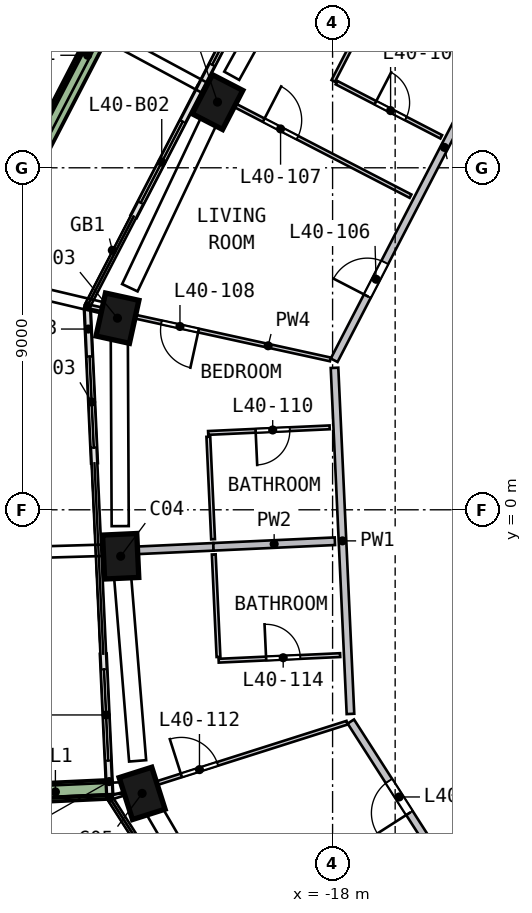
"""IFC4 building model, lengths in metres.
Left out: names, types, materials, properties, quantities, classifications, styles, units other than length and angle.
Written with IfcOpenShell. Run it as: python <this file> out.ifc"""

import sys

from ifc_helpers import new_model, si_unit, direction, frame, frame_2d, origin, origin_2d, place, context, subcontext, project, spatial, rectangle, extrude, element, fill, save


model = new_model("IFC4")
c1 = context("Model", 3, precision=1e-05, world=origin(), true_north=direction((0.0, 1.0)))
c2 = subcontext(c1, "Body", "Model", "MODEL_VIEW")
j1 = project(units=[si_unit("LENGTHUNIT", "METRE"), si_unit("PLANEANGLEUNIT", "RADIAN")], contexts=[c1])
p1 = place(None, origin())
s1 = spatial("IfcSite", under=j1, at=p1, CompositionType="ELEMENT")
p2 = place(p1, origin())
s2 = spatial("IfcBuilding", under=s1, at=p2, CompositionType="ELEMENT")
p3 = place(p2, frame((0.0, 0.0, 165.5)))
s3 = spatial("IfcBuildingStorey", under=s2, at=p3, CompositionType="ELEMENT", Elevation=165.5)
p4 = place(p3, frame((-20.967, 10.85, 0.0), z_axis=(-0.050783742, -0.100111899, 0.993679334), x_axis=(-0.457036789, -0.882336041, -0.112251882)))
e1 = element("IfcColumn", 1, at=p4, inside=s3, PredefinedType="COLUMN", context=c2, shape_type="SweptSolid", body=[
    extrude(rectangle(XDim=1.15, YDim=0.9, at=origin_2d()), origin(), (0.0, 0.0, 1.0), 3.019),
])
p5 = place(p3, frame((-23.632, 5.178, 0.0), z_axis=(-0.023766796, -0.112609342, 0.99335506), x_axis=(0.213378086, 0.970167516, 0.115085979)))
e2 = element("IfcColumn", 2, at=p5, inside=s3, PredefinedType="COLUMN", context=c2, shape_type="SweptSolid", body=[
    extrude(rectangle(XDim=1.15, YDim=0.9, at=origin_2d()), origin(), (0.0, 0.0, 1.0), 3.02),
])
p6 = place(p3, frame((-23.583, -1.087, 0.0), z_axis=(0.006145753, -0.112159985, 0.993671157), x_axis=(0.045945291, -0.992608833, -0.112324243)))
e3 = element("IfcColumn", 3, at=p6, inside=s3, PredefinedType="COLUMN", context=c2, shape_type="SweptSolid", body=[
    extrude(rectangle(XDim=1.15, YDim=0.9, at=origin_2d()), origin(), (0.0, 0.0, 1.0), 3.019),
])
p7 = place(p3, frame((-23.055, -7.331, 0.0), z_axis=(0.035812192, -0.109295901, 0.993363928), x_axis=(-0.301282406, 0.946573687, 0.115009418)))
e4 = element("IfcColumn", 4, at=p7, inside=s3, PredefinedType="COLUMN", context=c2, shape_type="SweptSolid", body=[
    extrude(rectangle(XDim=1.15, YDim=0.9, at=origin_2d()), origin(), (0.0, 0.0, 1.0), 3.02),
])
p8 = place(p3, frame((-19.881, 14.2, 0.0), z_axis=(0.0, 0.0, 1.0), x_axis=(-0.459564354, -0.888144473, 0.0)))
e5 = element("IfcWall", 5, at=p8, inside=s3, PredefinedType="SOLIDWALL", context=c2, shape_type="SweptSolid", body=[
    extrude(rectangle(XDim=3.475, YDim=0.15, at=frame_2d((1.737, 0.0))), origin(), (0.0, 0.0, 1.0), 2.935),
])
p9 = place(p8, frame((0.4, 0.0, 0.0)))
e6 = element("IfcOpeningElement", 6, at=p9, cuts=e5, PredefinedType="OPENING", context=c2, shape_type="SweptSolid", body=[
    extrude(rectangle(XDim=2.4, YDim=2.4, at=frame_2d((1.2, 1.2))), frame((0.0, 0.085, 0.0), z_axis=(0.0, -1.0, 0.0), x_axis=(1.0, 0.0, 0.0)), (0.0, 0.0, 1.0), 0.17),
])
p10 = place(p3, frame((-21.478, 11.114, 0.0), z_axis=(0.0, 0.0, 1.0), x_axis=(-0.459588339, -0.888132062, 0.0)))
e7 = element("IfcWall", 7, at=p10, inside=s3, PredefinedType="SOLIDWALL", context=c2, shape_type="SweptSolid", body=[
    extrude(rectangle(XDim=3.814, YDim=0.15, at=frame_2d((1.907, 0.0))), origin(), (0.0, 0.0, 1.0), 2.935),
])
p11 = place(p10, frame((1.014, 0.0, 0.0)))
e8 = element("IfcOpeningElement", 8, at=p11, cuts=e7, PredefinedType="OPENING", context=c2, shape_type="SweptSolid", body=[
    extrude(rectangle(XDim=2.4, YDim=2.4, at=frame_2d((1.2, 1.2))), frame((0.0, 0.085, 0.0), z_axis=(0.0, -1.0, 0.0), x_axis=(1.0, 0.0, 0.0)), (0.0, 0.0, 1.0), 0.17),
])
p12 = place(p3, frame((-24.452, 5.279, 0.0), z_axis=(0.0, 0.0, 1.0), x_axis=(0.046034373, -0.998939856, 0.0)))
e9 = element("IfcWall", 9, at=p12, inside=s3, PredefinedType="SOLIDWALL", context=c2, shape_type="SweptSolid", body=[
    extrude(rectangle(XDim=4.047, YDim=0.15, at=frame_2d((2.023, 0.0))), origin(), (0.0, 0.0, 1.0), 2.935),
])
p13 = place(p12, frame((1.247, 0.0, 0.0)))
e10 = element("IfcOpeningElement", 10, at=p13, cuts=e9, PredefinedType="OPENING", context=c2, shape_type="SweptSolid", body=[
    extrude(rectangle(XDim=2.4, YDim=2.4, at=frame_2d((1.2, 1.2))), frame((0.0, 0.085, 0.0), z_axis=(0.0, -1.0, 0.0), x_axis=(1.0, 0.0, 0.0)), (0.0, 0.0, 1.0), 0.17),
])
p14 = place(p3, frame((-24.034, -3.801, 0.0), z_axis=(0.0, 0.0, 1.0), x_axis=(0.046064357, -0.998938474, 0.0)))
e11 = element("IfcWall", 11, at=p14, inside=s3, PredefinedType="SOLIDWALL", context=c2, shape_type="SweptSolid", body=[
    extrude(rectangle(XDim=3.71, YDim=0.15, at=frame_2d((1.855, 0.0))), origin(), (0.0, 0.0, 1.0), 2.935),
])
p15 = place(p14, frame((0.4, 0.0, 0.0)))
e12 = element("IfcOpeningElement", 12, at=p15, cuts=e11, PredefinedType="OPENING", context=c2, shape_type="SweptSolid", body=[
    extrude(rectangle(XDim=2.4, YDim=2.4, at=frame_2d((1.2, 1.2))), frame((0.0, 0.085, 0.0), z_axis=(0.0, -1.0, 0.0), x_axis=(1.0, 0.0, 0.0)), (0.0, 0.0, 1.0), 0.17),
])
p16 = place(p3, frame((-21.407, 17.833, 0.0), z_axis=(0.0, 0.0, 1.0), x_axis=(-0.459570076, -0.888141512, 0.0)))
e13 = element("IfcWall", 13, at=p16, inside=s3, PredefinedType="SOLIDWALL", context=c2, shape_type="SweptSolid", body=[
    extrude(rectangle(XDim=13.224, YDim=0.5, at=frame_2d((6.612, 0.0))), origin(), (0.0, 0.0, 1.0), 0.7),
])
p17 = place(p3, frame((-26.642, -7.485, 0.0), z_axis=(0.0, 0.0, 1.0), x_axis=(0.998939428, 0.046043663, 0.0)))
e14 = element("IfcWall", 14, at=p17, inside=s3, PredefinedType="SOLIDWALL", context=c2, shape_type="SweptSolid", body=[
    extrude(rectangle(XDim=2.699, YDim=0.5, at=frame_2d((1.35, 0.0))), origin(), (0.0, 0.0, 1.0), 0.7),
])
p18 = place(p3, frame((-17.949, 3.736, 0.0), z_axis=(0.0, 0.0, 1.0), x_axis=(0.046061188, -0.99893862, 0.0)))
e15 = element("IfcWall", 15, at=p18, inside=s3, PredefinedType="SOLIDWALL", context=c2, shape_type="SweptSolid", body=[
    extrude(rectangle(XDim=9.117, YDim=0.2, at=frame_2d((4.558, 0.0))), origin(), (0.0, 0.0, 1.0), 3.0),
])
p19 = place(p3, frame((-17.959, 3.935, 0.0), z_axis=(0.0, 0.0, 1.0), x_axis=(0.459586917, 0.888132797, 0.0)))
e16 = element("IfcWall", 16, at=p19, inside=s3, PredefinedType="SOLIDWALL", context=c2, shape_type="SweptSolid", body=[
    extrude(rectangle(XDim=9.517, YDim=0.2, at=frame_2d((4.758, 0.0))), origin(), (0.0, 0.0, 1.0), 3.0),
])
p20 = place(p19, frame((1.9, 0.0, 0.0)))
e17 = element("IfcOpeningElement", 17, at=p20, cuts=e16, PredefinedType="OPENING", context=c2, shape_type="SweptSolid", body=[
    extrude(rectangle(XDim=1.0, YDim=2.1, at=frame_2d((0.5, 1.05))), frame((0.0, 0.11, 0.0), z_axis=(0.0, -1.0, 0.0), x_axis=(1.0, 0.0, 0.0)), (0.0, 0.0, 1.0), 0.22),
])
p21 = place(p3, frame((-12.387, -13.585, 0.0), z_axis=(0.0, 0.0, 1.0), x_axis=(-0.539356505, 0.842077526, 0.0)))
e18 = element("IfcWall", 18, at=p21, inside=s3, PredefinedType="SOLIDWALL", context=c2, shape_type="SweptSolid", body=[
    extrude(rectangle(XDim=9.517, YDim=0.2, at=frame_2d((4.758, 0.0))), origin(), (0.0, 0.0, 1.0), 3.0),
])
p22 = place(p21, frame((6.658, 0.0, 0.0)))
e19 = element("IfcOpeningElement", 19, at=p22, cuts=e18, PredefinedType="OPENING", context=c2, shape_type="SweptSolid", body=[
    extrude(rectangle(XDim=1.0, YDim=2.1, at=frame_2d((0.5, 1.05))), frame((0.0, 0.11, 0.0), z_axis=(0.0, -1.0, 0.0), x_axis=(1.0, 0.0, 0.0)), (0.0, 0.0, 1.0), 0.22),
])
p23 = place(p3, frame((-21.136, -0.975, 0.0), z_axis=(0.0, 0.0, 1.0), x_axis=(-0.998940711, -0.046015827, 0.0)))
e20 = element("IfcWall", 20, at=p23, inside=s3, PredefinedType="SOLIDWALL", context=c2, shape_type="SweptSolid", body=[
    extrude(rectangle(XDim=2.95, YDim=0.2, at=frame_2d((1.475, 0.0))), origin(), (0.0, 0.0, 1.0), 3.0),
])
p24 = place(p3, frame((-17.939, -0.827, 0.0), z_axis=(0.0, 0.0, 1.0), x_axis=(-0.998937799, -0.046079, 0.0)))
e21 = element("IfcWall", 21, at=p24, inside=s3, PredefinedType="SOLIDWALL", context=c2, shape_type="SweptSolid", body=[
    extrude(rectangle(XDim=3.2, YDim=0.2, at=frame_2d((1.6, 0.0))), origin(), (0.0, 0.0, 1.0), 3.0),
])
p25 = place(p3, frame((-18.06, 3.958, 0.0), z_axis=(0.0, 0.0, 1.0), x_axis=(-0.976827652, 0.214027425, 0.0)))
e22 = element("IfcWall", 22, at=p25, inside=s3, PredefinedType="PARTITIONING", context=c2, shape_type="SweptSolid", body=[
    extrude(rectangle(XDim=6.476, YDim=0.1, at=frame_2d((3.238, 0.0))), origin(), (0.0, 0.0, 1.0), 3.0),
])
p26 = place(p25, frame((3.55, 0.0, 0.0)))
e23 = element("IfcOpeningElement", 23, at=p26, cuts=e22, PredefinedType="OPENING", context=c2, shape_type="SweptSolid", body=[
    extrude(rectangle(XDim=1.0, YDim=2.1, at=frame_2d((0.5, 1.05))), frame((0.0, 0.06, 0.0), z_axis=(0.0, -1.0, 0.0), x_axis=(1.0, 0.0, 0.0)), (0.0, 0.0, 1.0), 0.12),
])
for number, where, z_axis, x_axis in (
    (24, (-21.269, 1.922, 0.0), (0.0, 0.0, 1.0), (0.046, -0.999, 0.0)),
    (25, (-21.127, -1.174, 0.0), (0.0, 0.0, 1.0), (0.046, -0.999, 0.0)),
):
    element("IfcWall", number, at=place(p3, frame(where, z_axis=z_axis, x_axis=x_axis)), inside=s3, PredefinedType="PARTITIONING", context=c2, shape_type="SweptSolid", body=[
        extrude(rectangle(XDim=2.7, YDim=0.1, at=frame_2d((1.35, 0.0))), origin(), (0.0, 0.0, 1.0), 3.0),
    ])
p27 = place(p3, frame((-23.79, -7.565, 0.0), z_axis=(0.0, 0.0, 1.0), x_axis=(0.952980228, 0.303032482, 0.0)))
e26 = element("IfcWall", 26, at=p27, inside=s3, PredefinedType="PARTITIONING", context=c2, shape_type="SweptSolid", body=[
    extrude(rectangle(XDim=6.476, YDim=0.1, at=frame_2d((3.238, 0.0))), origin(), (0.0, 0.0, 1.0), 3.0),
])
p28 = place(p27, frame((1.9, 0.0, 0.0)))
e27 = element("IfcOpeningElement", 27, at=p28, cuts=e26, PredefinedType="OPENING", context=c2, shape_type="SweptSolid", body=[
    extrude(rectangle(XDim=1.0, YDim=2.1, at=frame_2d((0.5, 1.05))), frame((0.0, 0.06, 0.0), z_axis=(0.0, -1.0, 0.0), x_axis=(1.0, 0.0, 0.0)), (0.0, 0.0, 1.0), 0.12),
])
p29 = place(p3, frame((-18.077, 2.17, 0.0), z_axis=(0.0, 0.0, 1.0), x_axis=(-0.998937799, -0.046079, 0.0)))
e28 = element("IfcWall", 28, at=p29, inside=s3, PredefinedType="PARTITIONING", context=c2, shape_type="SweptSolid", body=[
    extrude(rectangle(XDim=3.2, YDim=0.1, at=frame_2d((1.6, 0.0))), origin(), (0.0, 0.0, 1.0), 3.0),
])
p30 = place(p29, frame((1.05, 0.0, 0.0)))
e29 = element("IfcOpeningElement", 29, at=p30, cuts=e28, PredefinedType="OPENING", context=c2, shape_type="SweptSolid", body=[
    extrude(rectangle(XDim=0.9, YDim=2.1, at=frame_2d((0.45, 1.05))), frame((0.0, 0.06, 0.0), z_axis=(0.0, -1.0, 0.0), x_axis=(1.0, 0.0, 0.0)), (0.0, 0.0, 1.0), 0.12),
])
p31 = place(p3, frame((-20.998, -3.971, 0.0), z_axis=(0.0, 0.0, 1.0), x_axis=(0.998937799, 0.046079, 0.0)))
e30 = element("IfcWall", 30, at=p31, inside=s3, PredefinedType="PARTITIONING", context=c2, shape_type="SweptSolid", body=[
    extrude(rectangle(XDim=3.2, YDim=0.1, at=frame_2d((1.6, 0.0))), origin(), (0.0, 0.0, 1.0), 3.0),
])
p32 = place(p31, frame((1.25, 0.0, 0.0)))
e31 = element("IfcOpeningElement", 31, at=p32, cuts=e30, PredefinedType="OPENING", context=c2, shape_type="SweptSolid", body=[
    extrude(rectangle(XDim=0.9, YDim=2.1, at=frame_2d((0.45, 1.05))), frame((0.0, 0.06, 0.0), z_axis=(0.0, -1.0, 0.0), x_axis=(1.0, 0.0, 0.0)), (0.0, 0.0, 1.0), 0.12),
])
p33 = place(p3, frame((-21.412, 11.08, 0.0), z_axis=(0.0, 0.0, 1.0), x_axis=(0.888156748, -0.45954063, 0.0)))
e32 = element("IfcWall", 32, at=p33, inside=s3, PredefinedType="PARTITIONING", context=c2, shape_type="SweptSolid", body=[
    extrude(rectangle(XDim=6.15, YDim=0.1, at=frame_2d((3.075, 0.0))), origin(), (0.0, 0.0, 1.0), 3.0),
])
p34 = place(p33, frame((1.8, 0.0, 0.0)))
e33 = element("IfcOpeningElement", 33, at=p34, cuts=e32, PredefinedType="OPENING", context=c2, shape_type="SweptSolid", body=[
    extrude(rectangle(XDim=1.0, YDim=2.1, at=frame_2d((0.5, 1.05))), frame((0.0, 0.06, 0.0), z_axis=(0.0, -1.0, 0.0), x_axis=(1.0, 0.0, 0.0)), (0.0, 0.0, 1.0), 0.12),
])
p35 = place(p3, frame((-16.281, 14.575, 0.0), z_axis=(0.0, 0.0, 1.0), x_axis=(-0.459614775, -0.888118381, 0.0)))
e34 = element("IfcWall", 34, at=p35, inside=s3, PredefinedType="PARTITIONING", context=c2, shape_type="SweptSolid", body=[
    extrude(rectangle(XDim=3.704, YDim=0.1, at=frame_2d((1.852, 0.0))), origin(), (0.0, 0.0, 1.0), 3.0),
])
p36 = place(p3, frame((-17.895, 11.24, 0.0), z_axis=(0.0, 0.0, 1.0), x_axis=(0.88815114, -0.459551468, 0.0)))
e35 = element("IfcWall", 35, at=p36, inside=s3, PredefinedType="PARTITIONING", context=c2, shape_type="SweptSolid", body=[
    extrude(rectangle(XDim=3.1, YDim=0.1, at=frame_2d((1.55, 0.0))), origin(), (0.0, 0.0, 1.0), 3.0),
])
p37 = place(p36, frame((1.15, 0.0, 0.0)))
e36 = element("IfcOpeningElement", 36, at=p37, cuts=e35, PredefinedType="OPENING", context=c2, shape_type="SweptSolid", body=[
    extrude(rectangle(XDim=0.9, YDim=2.1, at=frame_2d((0.45, 1.05))), frame((0.0, 0.06, 0.0), z_axis=(0.0, -1.0, 0.0), x_axis=(1.0, 0.0, 0.0)), (0.0, 0.0, 1.0), 0.12),
])
p38 = place(p9, origin())
e37 = element("IfcDoor", 37, at=p38, inside=s3, OperationType="SLIDING_TO_RIGHT", PredefinedType="DOOR", context=c2, shape_type="SweptSolid", body=[
    extrude(rectangle(XDim=2.4, YDim=2.4, at=frame_2d((1.2, 1.2))), frame((0.0, 0.025, 0.0), z_axis=(0.0, -1.0, 0.0), x_axis=(1.0, 0.0, 0.0)), (0.0, 0.0, 1.0), 0.05),
])
fill(e6, e37)
p39 = place(p11, origin())
e38 = element("IfcDoor", 38, at=p39, inside=s3, OperationType="SLIDING_TO_LEFT", PredefinedType="DOOR", context=c2, shape_type="SweptSolid", body=[
    extrude(rectangle(XDim=2.4, YDim=2.4, at=frame_2d((1.2, 1.2))), frame((0.0, 0.025, 0.0), z_axis=(0.0, -1.0, 0.0), x_axis=(1.0, 0.0, 0.0)), (0.0, 0.0, 1.0), 0.05),
])
fill(e8, e38)
p40 = place(p13, origin())
e39 = element("IfcDoor", 39, at=p40, inside=s3, OperationType="SLIDING_TO_LEFT", PredefinedType="DOOR", context=c2, shape_type="SweptSolid", body=[
    extrude(rectangle(XDim=2.4, YDim=2.4, at=frame_2d((1.2, 1.2))), frame((0.0, 0.025, 0.0), z_axis=(0.0, -1.0, 0.0), x_axis=(1.0, 0.0, 0.0)), (0.0, 0.0, 1.0), 0.05),
])
fill(e10, e39)
p41 = place(p15, origin())
e40 = element("IfcDoor", 40, at=p41, inside=s3, OperationType="SLIDING_TO_RIGHT", PredefinedType="DOOR", context=c2, shape_type="SweptSolid", body=[
    extrude(rectangle(XDim=2.4, YDim=2.4, at=frame_2d((1.2, 1.2))), frame((0.0, 0.025, 0.0), z_axis=(0.0, -1.0, 0.0), x_axis=(1.0, 0.0, 0.0)), (0.0, 0.0, 1.0), 0.05),
])
fill(e12, e40)
p42 = place(p20, origin())
e41 = element("IfcDoor", 41, at=p42, inside=s3, OperationType="SINGLE_SWING_LEFT", PredefinedType="DOOR", context=c2, shape_type="SweptSolid", body=[
    extrude(rectangle(XDim=1.0, YDim=2.1, at=frame_2d((0.5, 1.05))), frame((0.0, 0.025, 0.0), z_axis=(0.0, -1.0, 0.0), x_axis=(1.0, 0.0, 0.0)), (0.0, 0.0, 1.0), 0.05),
])
fill(e17, e41)
p43 = place(p34, origin())
e42 = element("IfcDoor", 42, at=p43, inside=s3, OperationType="SINGLE_SWING_LEFT", PredefinedType="DOOR", context=c2, shape_type="SweptSolid", body=[
    extrude(rectangle(XDim=1.0, YDim=2.1, at=frame_2d((0.5, 1.05))), frame((0.0, 0.025, 0.0), z_axis=(0.0, -1.0, 0.0), x_axis=(1.0, 0.0, 0.0)), (0.0, 0.0, 1.0), 0.05),
])
fill(e33, e42)
p44 = place(p26, origin())
e43 = element("IfcDoor", 43, at=p44, inside=s3, OperationType="SINGLE_SWING_LEFT", PredefinedType="DOOR", context=c2, shape_type="SweptSolid", body=[
    extrude(rectangle(XDim=1.0, YDim=2.1, at=frame_2d((0.5, 1.05))), frame((0.0, 0.025, 0.0), z_axis=(0.0, -1.0, 0.0), x_axis=(1.0, 0.0, 0.0)), (0.0, 0.0, 1.0), 0.05),
])
fill(e23, e43)
p45 = place(p37, origin())
e44 = element("IfcDoor", 44, at=p45, inside=s3, OperationType="SINGLE_SWING_LEFT", PredefinedType="DOOR", context=c2, shape_type="SweptSolid", body=[
    extrude(rectangle(XDim=0.9, YDim=2.1, at=frame_2d((0.45, 1.05))), frame((0.0, 0.025, 0.0), z_axis=(0.0, -1.0, 0.0), x_axis=(1.0, 0.0, 0.0)), (0.0, 0.0, 1.0), 0.05),
])
fill(e36, e44)
p46 = place(p30, origin())
e45 = element("IfcDoor", 45, at=p46, inside=s3, OperationType="SINGLE_SWING_RIGHT", PredefinedType="DOOR", context=c2, shape_type="SweptSolid", body=[
    extrude(rectangle(XDim=0.9, YDim=2.1, at=frame_2d((0.45, 1.05))), frame((0.0, 0.025, 0.0), z_axis=(0.0, -1.0, 0.0), x_axis=(1.0, 0.0, 0.0)), (0.0, 0.0, 1.0), 0.05),
])
fill(e29, e45)
p47 = place(p22, origin())
e46 = element("IfcDoor", 46, at=p47, inside=s3, OperationType="SINGLE_SWING_LEFT", PredefinedType="DOOR", context=c2, shape_type="SweptSolid", body=[
    extrude(rectangle(XDim=1.0, YDim=2.1, at=frame_2d((0.5, 1.05))), frame((0.0, 0.025, 0.0), z_axis=(0.0, -1.0, 0.0), x_axis=(1.0, 0.0, 0.0)), (0.0, 0.0, 1.0), 0.05),
])
fill(e19, e46)
p48 = place(p28, origin())
e47 = element("IfcDoor", 47, at=p48, inside=s3, OperationType="SINGLE_SWING_LEFT", PredefinedType="DOOR", context=c2, shape_type="SweptSolid", body=[
    extrude(rectangle(XDim=1.0, YDim=2.1, at=frame_2d((0.5, 1.05))), frame((0.0, 0.025, 0.0), z_axis=(0.0, -1.0, 0.0), x_axis=(1.0, 0.0, 0.0)), (0.0, 0.0, 1.0), 0.05),
])
fill(e27, e47)
p49 = place(p32, origin())
e48 = element("IfcDoor", 48, at=p49, inside=s3, OperationType="SINGLE_SWING_LEFT", PredefinedType="DOOR", context=c2, shape_type="SweptSolid", body=[
    extrude(rectangle(XDim=0.9, YDim=2.1, at=frame_2d((0.45, 1.05))), frame((0.0, 0.025, 0.0), z_axis=(0.0, -1.0, 0.0), x_axis=(1.0, 0.0, 0.0)), (0.0, 0.0, 1.0), 0.05),
])
fill(e31, e48)
save(model, sys.argv[1])
